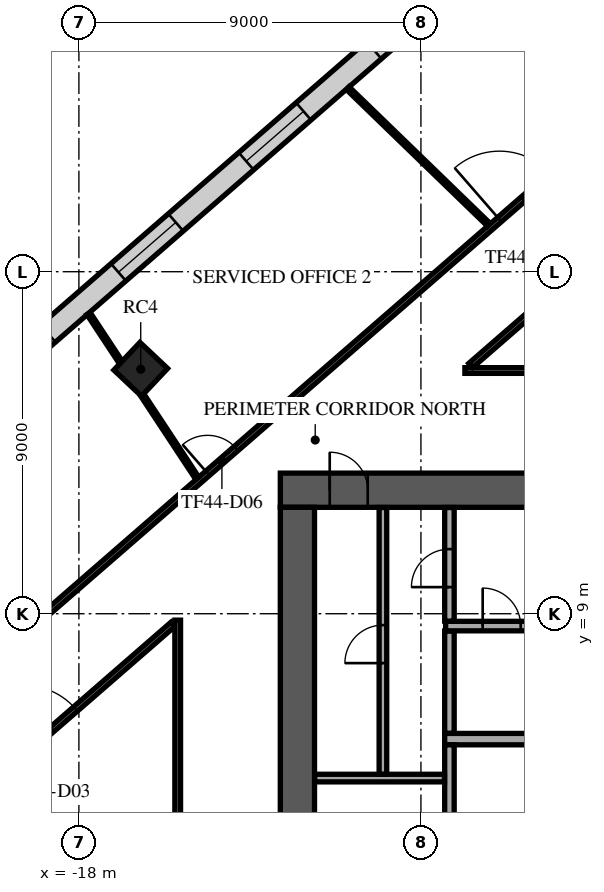
"""IFC4 building model, lengths in metres.
Left out: names, types, materials, properties, quantities, classifications, styles, units other than length and angle.
Written with IfcOpenShell. Run it as: python <this file> out.ifc"""

import sys

from ifc_helpers import new_model, si_unit, direction, frame, frame_2d, origin, origin_2d, place, context, subcontext, project, spatial, rectangle, extrude, element, fill, save


model = new_model("IFC4")
c1 = context("Model", 3, precision=1e-05, world=origin(), true_north=direction((0.0, 1.0)))
c2 = subcontext(c1, "Body", "Model", "MODEL_VIEW")
j1 = project(units=[si_unit("LENGTHUNIT", "METRE"), si_unit("PLANEANGLEUNIT", "RADIAN")], contexts=[c1])
p1 = place(None, origin())
s1 = spatial("IfcSite", under=j1, at=p1, CompositionType="ELEMENT")
p2 = place(p1, origin())
s2 = spatial("IfcBuilding", under=s1, at=p2, CompositionType="ELEMENT")
p3 = place(p2, frame((0.0, 0.0, 193.3)))
s3 = spatial("IfcBuildingStorey", under=s2, at=p3, CompositionType="ELEMENT", Elevation=193.3)
p4 = place(p3, frame((-16.373, 15.433, 0.0), z_axis=(0.0, 0.0, 1.0), x_axis=(0.685916152371, 0.727680583715, 0.0)))
e1 = element("IfcColumn", 1, at=p4, inside=s3, PredefinedType="COLUMN", context=c2, shape_type="SweptSolid", body=[
    extrude(rectangle(XDim=1.0, YDim=1.0, at=origin_2d()), origin(), (0.0, 0.0, 1.0), 4.0),
])
p5 = place(p3, frame((-12.7, 12.25, 0.0), z_axis=(0.0, 0.0, 1.0), x_axis=(1.0, 0.0, 0.0)))
e2 = element("IfcWall", 2, at=p5, inside=s3, PredefinedType="SHEAR", context=c2, shape_type="SweptSolid", body=[
    extrude(rectangle(XDim=25.4, YDim=0.9, at=frame_2d((12.7, 0.0))), origin(), (0.0, 0.0, 1.0), 3.62),
])
p6 = place(p5, frame((11.5, 0.0, 0.0)))
e3 = element("IfcOpeningElement", 3, at=p6, cuts=e2, PredefinedType="OPENING", context=c2, shape_type="SweptSolid", body=[
    extrude(rectangle(XDim=2.4, YDim=2.4, at=frame_2d((1.2, 1.2))), frame((0.0, 0.46, 0.0), z_axis=(0.0, -1.0, 0.0), x_axis=(1.0, 0.0, 0.0)), (0.0, 0.0, 1.0), 0.92),
])
p7 = place(p5, frame((22.325, 0.0, 0.0)))
e4 = element("IfcOpeningElement", 4, at=p7, cuts=e2, PredefinedType="OPENING", context=c2, shape_type="SweptSolid", body=[
    extrude(rectangle(XDim=1.2, YDim=2.1, at=frame_2d((0.6, 1.05))), frame((0.0, 0.46, 0.0), z_axis=(0.0, -1.0, 0.0), x_axis=(1.0, 0.0, 0.0)), (0.0, 0.0, 1.0), 0.92),
])
p8 = place(p5, frame((1.3, 0.0, 0.0)))
e5 = element("IfcOpeningElement", 5, at=p8, cuts=e2, PredefinedType="OPENING", context=c2, shape_type="SweptSolid", body=[
    extrude(rectangle(XDim=1.0, YDim=2.1, at=frame_2d((0.5, 1.05))), frame((0.0, 0.46, 0.0), z_axis=(0.0, -1.0, 0.0), x_axis=(1.0, 0.0, 0.0)), (0.0, 0.0, 1.0), 0.92),
])
p9 = place(p3, frame((-12.25, -11.8, 0.0), z_axis=(0.0, 0.0, 1.0), x_axis=(0.0, 1.0, 0.0)))
e6 = element("IfcWall", 6, at=p9, inside=s3, PredefinedType="SHEAR", context=c2, shape_type="SweptSolid", body=[
    extrude(rectangle(XDim=23.6, YDim=0.9, at=frame_2d((11.8, 0.0))), origin(), (0.0, 0.0, 1.0), 3.62),
])
p10 = place(p9, frame((10.6, 0.0, 0.0)))
e7 = element("IfcOpeningElement", 7, at=p10, cuts=e6, PredefinedType="OPENING", context=c2, shape_type="SweptSolid", body=[
    extrude(rectangle(XDim=2.4, YDim=2.4, at=frame_2d((1.2, 1.2))), frame((0.0, 0.46, 0.0), z_axis=(0.0, -1.0, 0.0), x_axis=(1.0, 0.0, 0.0)), (0.0, 0.0, 1.0), 0.92),
])
p11 = place(p3, frame((-8.375, 5.7, 0.0), z_axis=(0.0, 0.0, 1.0), x_axis=(1.0, 0.0, 0.0)))
e8 = element("IfcWall", 8, at=p11, inside=s3, PredefinedType="SOLIDWALL", context=c2, shape_type="SweptSolid", body=[
    extrude(rectangle(XDim=16.75, YDim=0.3, at=frame_2d((8.375, 0.0))), origin(), (0.0, 0.0, 1.0), 3.62),
])
p12 = place(p3, frame((-8.25, 2.85, 0.0), z_axis=(0.0, 0.0, 1.0), x_axis=(0.0, 1.0, 0.0)))
e9 = element("IfcWall", 9, at=p12, inside=s3, PredefinedType="SOLIDWALL", context=c2, shape_type="SweptSolid", body=[
    extrude(rectangle(XDim=2.7, YDim=0.25, at=frame_2d((1.35, 0.0))), origin(), (0.0, 0.0, 1.0), 3.62),
])
p13 = place(p3, frame((-11.795, 4.675, 0.0), z_axis=(0.0, 0.0, 1.0), x_axis=(1.0, 0.0, 0.0)))
e10 = element("IfcWall", 10, at=p13, inside=s3, PredefinedType="PARTITIONING", context=c2, shape_type="SweptSolid", body=[
    extrude(rectangle(XDim=3.415, YDim=0.2, at=frame_2d((1.708, 0.0))), origin(), (0.0, 0.0, 1.0), 3.62),
])
p14 = place(p3, frame((-10.0, 4.78, 0.0), z_axis=(0.0, 0.0, 1.0), x_axis=(0.0, 1.0, 0.0)))
e11 = element("IfcWall", 11, at=p14, inside=s3, PredefinedType="PARTITIONING", context=c2, shape_type="SweptSolid", body=[
    extrude(rectangle(XDim=7.015, YDim=0.2, at=frame_2d((3.507, 0.0))), origin(), (0.0, 0.0, 1.0), 3.62),
])
p15 = place(p14, frame((2.92, 0.0, 0.0)))
e12 = element("IfcOpeningElement", 12, at=p15, cuts=e11, PredefinedType="OPENING", context=c2, shape_type="SweptSolid", body=[
    extrude(rectangle(XDim=1.0, YDim=2.1, at=frame_2d((0.5, 1.05))), frame((0.0, 0.11, 0.0), z_axis=(0.0, -1.0, 0.0), x_axis=(1.0, 0.0, 0.0)), (0.0, 0.0, 1.0), 0.22),
])
p16 = place(p3, frame((-8.25, 5.855, 0.0), z_axis=(0.0, 0.0, 1.0), x_axis=(0.0, 1.0, 0.0)))
e13 = element("IfcWall", 13, at=p16, inside=s3, PredefinedType="PARTITIONING", context=c2, shape_type="SweptSolid", body=[
    extrude(rectangle(XDim=2.69, YDim=0.25, at=frame_2d((1.345, 0.0))), origin(), (0.0, 0.0, 1.0), 3.62),
])
p17 = place(p3, frame((-8.35, 8.675, 0.0), z_axis=(0.0, 0.0, 1.0), x_axis=(1.0, 0.0, 0.0)))
e14 = element("IfcWall", 14, at=p17, inside=s3, PredefinedType="PARTITIONING", context=c2, shape_type="SweptSolid", body=[
    extrude(rectangle(XDim=16.72, YDim=0.25, at=frame_2d((8.36, 0.0))), origin(), (0.0, 0.0, 1.0), 3.62),
])
p18 = place(p17, frame((0.975, 0.0, 0.0)))
e15 = element("IfcOpeningElement", 15, at=p18, cuts=e14, PredefinedType="OPENING", context=c2, shape_type="SweptSolid", body=[
    extrude(rectangle(XDim=1.0, YDim=2.1, at=frame_2d((0.5, 1.05))), frame((0.0, 0.135, 0.0), z_axis=(0.0, -1.0, 0.0), x_axis=(1.0, 0.0, 0.0)), (0.0, 0.0, 1.0), 0.27),
])
p19 = place(p17, frame((6.375, 0.0, 0.0)))
e16 = element("IfcOpeningElement", 16, at=p19, cuts=e14, PredefinedType="OPENING", context=c2, shape_type="SweptSolid", body=[
    extrude(rectangle(XDim=1.2, YDim=2.1, at=frame_2d((0.6, 1.05))), frame((0.0, 0.135, 0.0), z_axis=(0.0, -1.0, 0.0), x_axis=(1.0, 0.0, 0.0)), (0.0, 0.0, 1.0), 0.27),
])
p20 = place(p3, frame((-8.25, 8.805, 0.0), z_axis=(0.0, 0.0, 1.0), x_axis=(0.0, 1.0, 0.0)))
e17 = element("IfcWall", 17, at=p20, inside=s3, PredefinedType="PARTITIONING", context=c2, shape_type="SweptSolid", body=[
    extrude(rectangle(XDim=2.99, YDim=0.25, at=frame_2d((1.495, 0.0))), origin(), (0.0, 0.0, 1.0), 3.62),
])
p21 = place(p20, frame((0.895, 0.0, 0.0)))
e18 = element("IfcOpeningElement", 18, at=p21, cuts=e17, PredefinedType="OPENING", context=c2, shape_type="SweptSolid", body=[
    extrude(rectangle(XDim=1.0, YDim=2.1, at=frame_2d((0.5, 1.05))), frame((0.0, 0.135, 0.0), z_axis=(0.0, -1.0, 0.0), x_axis=(1.0, 0.0, 0.0)), (0.0, 0.0, 1.0), 0.27),
])
p22 = place(p3, frame((2.286, 34.715, 0.0), z_axis=(0.0, 0.0, 1.0), x_axis=(-0.754708272811, -0.656060532993, 0.0)))
e19 = element("IfcWall", 19, at=p22, inside=s3, PredefinedType="STANDARD", context=c2, shape_type="SweptSolid", body=[
    extrude(rectangle(XDim=49.0, YDim=0.6, at=frame_2d((24.5, 0.0))), origin(), (0.0, 0.0, 1.0), 3.62),
])
p23 = place(p22, frame((1.227, 0.0, 0.9)))
e20 = element("IfcOpeningElement", 20, at=p23, cuts=e19, PredefinedType="OPENING", context=c2, shape_type="SweptSolid", body=[
    extrude(rectangle(XDim=2.0, YDim=2.1, at=frame_2d((1.0, 1.05))), frame((0.0, 0.31, 0.0), z_axis=(0.0, -1.0, 0.0), x_axis=(1.0, 0.0, 0.0)), (0.0, 0.0, 1.0), 0.62),
])
p24 = place(p22, frame((5.682, 0.0, 0.9)))
e21 = element("IfcOpeningElement", 21, at=p24, cuts=e19, PredefinedType="OPENING", context=c2, shape_type="SweptSolid", body=[
    extrude(rectangle(XDim=2.0, YDim=2.1, at=frame_2d((1.0, 1.05))), frame((0.0, 0.31, 0.0), z_axis=(0.0, -1.0, 0.0), x_axis=(1.0, 0.0, 0.0)), (0.0, 0.0, 1.0), 0.62),
])
p25 = place(p22, frame((10.136, 0.0, 0.9)))
e22 = element("IfcOpeningElement", 22, at=p25, cuts=e19, PredefinedType="OPENING", context=c2, shape_type="SweptSolid", body=[
    extrude(rectangle(XDim=2.0, YDim=2.1, at=frame_2d((1.0, 1.05))), frame((0.0, 0.31, 0.0), z_axis=(0.0, -1.0, 0.0), x_axis=(1.0, 0.0, 0.0)), (0.0, 0.0, 1.0), 0.62),
])
p26 = place(p22, frame((14.591, 0.0, 0.9)))
e23 = element("IfcOpeningElement", 23, at=p26, cuts=e19, PredefinedType="OPENING", context=c2, shape_type="SweptSolid", body=[
    extrude(rectangle(XDim=2.0, YDim=2.1, at=frame_2d((1.0, 1.05))), frame((0.0, 0.31, 0.0), z_axis=(0.0, -1.0, 0.0), x_axis=(1.0, 0.0, 0.0)), (0.0, 0.0, 1.0), 0.62),
])
p27 = place(p22, frame((19.045, 0.0, 0.9)))
e24 = element("IfcOpeningElement", 24, at=p27, cuts=e19, PredefinedType="OPENING", context=c2, shape_type="SweptSolid", body=[
    extrude(rectangle(XDim=2.0, YDim=2.1, at=frame_2d((1.0, 1.05))), frame((0.0, 0.31, 0.0), z_axis=(0.0, -1.0, 0.0), x_axis=(1.0, 0.0, 0.0)), (0.0, 0.0, 1.0), 0.62),
])
p28 = place(p22, frame((23.5, 0.0, 0.9)))
e25 = element("IfcOpeningElement", 25, at=p28, cuts=e19, PredefinedType="OPENING", context=c2, shape_type="SweptSolid", body=[
    extrude(rectangle(XDim=2.0, YDim=2.1, at=frame_2d((1.0, 1.05))), frame((0.0, 0.31, 0.0), z_axis=(0.0, -1.0, 0.0), x_axis=(1.0, 0.0, 0.0)), (0.0, 0.0, 1.0), 0.62),
])
p29 = place(p22, frame((27.955, 0.0, 0.9)))
e26 = element("IfcOpeningElement", 26, at=p29, cuts=e19, PredefinedType="OPENING", context=c2, shape_type="SweptSolid", body=[
    extrude(rectangle(XDim=2.0, YDim=2.1, at=frame_2d((1.0, 1.05))), frame((0.0, 0.31, 0.0), z_axis=(0.0, -1.0, 0.0), x_axis=(1.0, 0.0, 0.0)), (0.0, 0.0, 1.0), 0.62),
])
p30 = place(p22, frame((32.409, 0.0, 0.9)))
e27 = element("IfcOpeningElement", 27, at=p30, cuts=e19, PredefinedType="OPENING", context=c2, shape_type="SweptSolid", body=[
    extrude(rectangle(XDim=2.0, YDim=2.1, at=frame_2d((1.0, 1.05))), frame((0.0, 0.31, 0.0), z_axis=(0.0, -1.0, 0.0), x_axis=(1.0, 0.0, 0.0)), (0.0, 0.0, 1.0), 0.62),
])
p31 = place(p22, frame((36.864, 0.0, 0.9)))
e28 = element("IfcOpeningElement", 28, at=p31, cuts=e19, PredefinedType="OPENING", context=c2, shape_type="SweptSolid", body=[
    extrude(rectangle(XDim=2.0, YDim=2.1, at=frame_2d((1.0, 1.05))), frame((0.0, 0.31, 0.0), z_axis=(0.0, -1.0, 0.0), x_axis=(1.0, 0.0, 0.0)), (0.0, 0.0, 1.0), 0.62),
])
p32 = place(p22, frame((41.318, 0.0, 0.9)))
e29 = element("IfcOpeningElement", 29, at=p32, cuts=e19, PredefinedType="OPENING", context=c2, shape_type="SweptSolid", body=[
    extrude(rectangle(XDim=2.0, YDim=2.1, at=frame_2d((1.0, 1.05))), frame((0.0, 0.31, 0.0), z_axis=(0.0, -1.0, 0.0), x_axis=(1.0, 0.0, 0.0)), (0.0, 0.0, 1.0), 0.62),
])
p33 = place(p22, frame((45.773, 0.0, 0.9)))
e30 = element("IfcOpeningElement", 30, at=p33, cuts=e19, PredefinedType="OPENING", context=c2, shape_type="SweptSolid", body=[
    extrude(rectangle(XDim=2.0, YDim=2.1, at=frame_2d((1.0, 1.05))), frame((0.0, 0.31, 0.0), z_axis=(0.0, -1.0, 0.0), x_axis=(1.0, 0.0, 0.0)), (0.0, 0.0, 1.0), 0.62),
])
p34 = place(p3, frame((-26.208, 2.616, 0.0), z_axis=(0.0, 0.0, 1.0), x_axis=(0.754710701231, 0.656057739416, 0.0)))
e31 = element("IfcWall", 31, at=p34, inside=s3, PredefinedType="PARTITIONING", context=c2, shape_type="SweptSolid", body=[
    extrude(rectangle(XDim=36.126, YDim=0.15, at=frame_2d((18.063, 0.0))), origin(), (0.0, 0.0, 1.0), 3.17),
])
p35 = place(p34, frame((2.551, 0.0, 0.0)))
e32 = element("IfcOpeningElement", 32, at=p35, cuts=e31, PredefinedType="OPENING", context=c2, shape_type="SweptSolid", body=[
    extrude(rectangle(XDim=1.0, YDim=2.1, at=frame_2d((0.5, 1.05))), frame((0.0, 0.085, 0.0), z_axis=(0.0, -1.0, 0.0), x_axis=(1.0, 0.0, 0.0)), (0.0, 0.0, 1.0), 0.17),
])
p36 = place(p34, frame((15.362, 0.0, 0.0)))
e33 = element("IfcOpeningElement", 33, at=p36, cuts=e31, PredefinedType="OPENING", context=c2, shape_type="SweptSolid", body=[
    extrude(rectangle(XDim=1.0, YDim=2.1, at=frame_2d((0.5, 1.05))), frame((0.0, 0.085, 0.0), z_axis=(0.0, -1.0, 0.0), x_axis=(1.0, 0.0, 0.0)), (0.0, 0.0, 1.0), 0.17),
])
p37 = place(p34, frame((25.542, 0.0, 0.0)))
e34 = element("IfcOpeningElement", 34, at=p37, cuts=e31, PredefinedType="OPENING", context=c2, shape_type="SweptSolid", body=[
    extrude(rectangle(XDim=1.8, YDim=2.1, at=frame_2d((0.9, 1.05))), frame((0.0, 0.085, 0.0), z_axis=(0.0, -1.0, 0.0), x_axis=(1.0, 0.0, 0.0)), (0.0, 0.0, 1.0), 0.17),
])
p38 = place(p3, frame((-24.576, 0.854, 0.0), z_axis=(0.0, 0.0, 1.0), x_axis=(0.75472382762, 0.656042638875, 0.0)))
e35 = element("IfcWall", 35, at=p38, inside=s3, PredefinedType="PARTITIONING", context=c2, shape_type="SweptSolid", body=[
    extrude(rectangle(XDim=11.994, YDim=0.15, at=frame_2d((5.997, 0.0))), origin(), (0.0, 0.0, 1.0), 3.17),
])
p39 = place(p38, frame((6.8, 0.0, 0.0)))
e36 = element("IfcOpeningElement", 36, at=p39, cuts=e35, PredefinedType="OPENING", context=c2, shape_type="SweptSolid", body=[
    extrude(rectangle(XDim=1.8, YDim=2.1, at=frame_2d((0.9, 1.05))), frame((0.0, 0.085, 0.0), z_axis=(0.0, -1.0, 0.0), x_axis=(1.0, 0.0, 0.0)), (0.0, 0.0, 1.0), 0.17),
])
p40 = place(p3, frame((-15.4, -11.834, 0.0), z_axis=(0.0, 0.0, 1.0), x_axis=(0.0, 1.0, 0.0)))
e37 = element("IfcWall", 37, at=p40, inside=s3, PredefinedType="PARTITIONING", context=c2, shape_type="SweptSolid", body=[
    extrude(rectangle(XDim=20.666, YDim=0.15, at=frame_2d((10.333, 0.0))), origin(), (0.0, 0.0, 1.0), 3.17),
])
p41 = place(p3, frame((-7.843, 15.4, 0.0), z_axis=(0.0, 0.0, 1.0), x_axis=(1.0, 0.0, 0.0)))
e38 = element("IfcWall", 38, at=p41, inside=s3, PredefinedType="PARTITIONING", context=c2, shape_type="SweptSolid", body=[
    extrude(rectangle(XDim=20.318, YDim=0.15, at=frame_2d((10.159, 0.0))), origin(), (0.0, 0.0, 1.0), 3.17),
])
p42 = place(p41, frame((9.55, 0.0, 0.0)))
e39 = element("IfcOpeningElement", 39, at=p42, cuts=e38, PredefinedType="OPENING", context=c2, shape_type="SweptSolid", body=[
    extrude(rectangle(XDim=1.0, YDim=2.1, at=frame_2d((0.5, 1.05))), frame((0.0, 0.085, 0.0), z_axis=(0.0, -1.0, 0.0), x_axis=(1.0, 0.0, 0.0)), (0.0, 0.0, 1.0), 0.17),
])
p43 = place(p3, frame((-7.692, 15.531, 0.0), z_axis=(0.0, 0.0, 1.0), x_axis=(0.754705202017, 0.656064065506, 0.0)))
e40 = element("IfcWall", 40, at=p43, inside=s3, PredefinedType="PARTITIONING", context=c2, shape_type="SweptSolid", body=[
    extrude(rectangle(XDim=13.603, YDim=0.15, at=frame_2d((6.801, 0.0))), origin(), (0.0, 0.0, 1.0), 3.17),
])
p44 = place(p3, frame((-17.747, 16.901, 0.0), z_axis=(0.0, 0.0, 1.0), x_axis=(0.550725721205, -0.834686276396, 0.0)))
e41 = element("IfcWall", 41, at=p44, inside=s3, PredefinedType="PARTITIONING", context=c2, shape_type="SweptSolid", body=[
    extrude(rectangle(XDim=1.548, YDim=0.1, at=frame_2d((0.774, 0.0))), origin(), (0.0, 0.0, 1.0), 3.62),
])
p45 = place(p3, frame((-16.328, 14.751, 0.0), z_axis=(0.0, 0.0, 1.0), x_axis=(0.550713616712, -0.83469426281, 0.0)))
e42 = element("IfcWall", 42, at=p45, inside=s3, PredefinedType="PARTITIONING", context=c2, shape_type="SweptSolid", body=[
    extrude(rectangle(XDim=2.619, YDim=0.1, at=frame_2d((1.309, 0.0))), origin(), (0.0, 0.0, 1.0), 3.17),
])
p46 = place(p3, frame((-10.926, 22.83, 0.0), z_axis=(0.0, 0.0, 1.0), x_axis=(0.718303647436, -0.695729739252, 0.0)))
e43 = element("IfcWall", 43, at=p46, inside=s3, PredefinedType="PARTITIONING", context=c2, shape_type="SweptSolid", body=[
    extrude(rectangle(XDim=5.17, YDim=0.1, at=frame_2d((2.585, 0.0))), origin(), (0.0, 0.0, 1.0), 3.17),
])
p47 = place(p8, origin())
e44 = element("IfcDoor", 44, at=p47, inside=s3, OperationType="SINGLE_SWING_LEFT", PredefinedType="DOOR", context=c2, shape_type="SweptSolid", body=[
    extrude(rectangle(XDim=1.0, YDim=2.1, at=frame_2d((0.5, 1.05))), frame((0.0, 0.025, 0.0), z_axis=(0.0, -1.0, 0.0), x_axis=(1.0, 0.0, 0.0)), (0.0, 0.0, 1.0), 0.05),
])
fill(e5, e44)
p48 = place(p15, origin())
e45 = element("IfcDoor", 45, at=p48, inside=s3, OperationType="SINGLE_SWING_RIGHT", PredefinedType="DOOR", context=c2, shape_type="SweptSolid", body=[
    extrude(rectangle(XDim=1.0, YDim=2.1, at=frame_2d((0.5, 1.05))), frame((0.0, 0.025, 0.0), z_axis=(0.0, -1.0, 0.0), x_axis=(1.0, 0.0, 0.0)), (0.0, 0.0, 1.0), 0.05),
])
fill(e12, e45)
p49 = place(p21, origin())
e46 = element("IfcDoor", 46, at=p49, inside=s3, OperationType="SINGLE_SWING_RIGHT", PredefinedType="DOOR", context=c2, shape_type="SweptSolid", body=[
    extrude(rectangle(XDim=1.0, YDim=2.1, at=frame_2d((0.5, 1.05))), frame((0.0, 0.025, 0.0), z_axis=(0.0, -1.0, 0.0), x_axis=(1.0, 0.0, 0.0)), (0.0, 0.0, 1.0), 0.05),
])
fill(e18, e46)
p50 = place(p18, origin())
e47 = element("IfcDoor", 47, at=p50, inside=s3, OperationType="SINGLE_SWING_RIGHT", PredefinedType="DOOR", context=c2, shape_type="SweptSolid", body=[
    extrude(rectangle(XDim=1.0, YDim=2.1, at=frame_2d((0.5, 1.05))), frame((0.0, 0.025, 0.0), z_axis=(0.0, -1.0, 0.0), x_axis=(1.0, 0.0, 0.0)), (0.0, 0.0, 1.0), 0.05),
])
fill(e15, e47)
p51 = place(p27, origin())
e48 = element("IfcWindow", 48, at=p51, inside=s3, PartitioningType="SINGLE_PANEL", PredefinedType="WINDOW", context=c2, shape_type="SweptSolid", body=[
    extrude(rectangle(XDim=2.0, YDim=2.1, at=frame_2d((1.0, 1.05))), frame((0.0, 0.03, 0.0), z_axis=(0.0, -1.0, 0.0), x_axis=(1.0, 0.0, 0.0)), (0.0, 0.0, 1.0), 0.06),
])
fill(e24, e48)
p52 = place(p28, origin())
e49 = element("IfcWindow", 49, at=p52, inside=s3, PartitioningType="SINGLE_PANEL", PredefinedType="WINDOW", context=c2, shape_type="SweptSolid", body=[
    extrude(rectangle(XDim=2.0, YDim=2.1, at=frame_2d((1.0, 1.05))), frame((0.0, 0.03, 0.0), z_axis=(0.0, -1.0, 0.0), x_axis=(1.0, 0.0, 0.0)), (0.0, 0.0, 1.0), 0.06),
])
fill(e25, e49)
p53 = place(p39, frame((1.8, 0.0, 0.0), z_axis=(0.0, 0.0, 1.0), x_axis=(-1.0, 0.0, 0.0)))
e50 = element("IfcDoor", 50, at=p53, inside=s3, OperationType="DOUBLE_DOOR_SINGLE_SWING", PredefinedType="DOOR", context=c2, shape_type="SweptSolid", body=[
    extrude(rectangle(XDim=1.8, YDim=2.1, at=frame_2d((0.9, 1.05))), frame((0.0, 0.025, 0.0), z_axis=(0.0, -1.0, 0.0), x_axis=(1.0, 0.0, 0.0)), (0.0, 0.0, 1.0), 0.05),
])
fill(e36, e50)
p54 = place(p36, origin())
e51 = element("IfcDoor", 51, at=p54, inside=s3, OperationType="SINGLE_SWING_RIGHT", PredefinedType="DOOR", context=c2, shape_type="SweptSolid", body=[
    extrude(rectangle(XDim=1.0, YDim=2.1, at=frame_2d((0.5, 1.05))), frame((0.0, 0.025, 0.0), z_axis=(0.0, -1.0, 0.0), x_axis=(1.0, 0.0, 0.0)), (0.0, 0.0, 1.0), 0.05),
])
fill(e33, e51)
p55 = place(p37, origin())
e52 = element("IfcDoor", 52, at=p55, inside=s3, OperationType="DOUBLE_DOOR_SINGLE_SWING", PredefinedType="DOOR", context=c2, shape_type="SweptSolid", body=[
    extrude(rectangle(XDim=1.8, YDim=2.1, at=frame_2d((0.9, 1.05))), frame((0.0, 0.025, 0.0), z_axis=(0.0, -1.0, 0.0), x_axis=(1.0, 0.0, 0.0)), (0.0, 0.0, 1.0), 0.05),
])
fill(e34, e52)
save(model, sys.argv[1])
